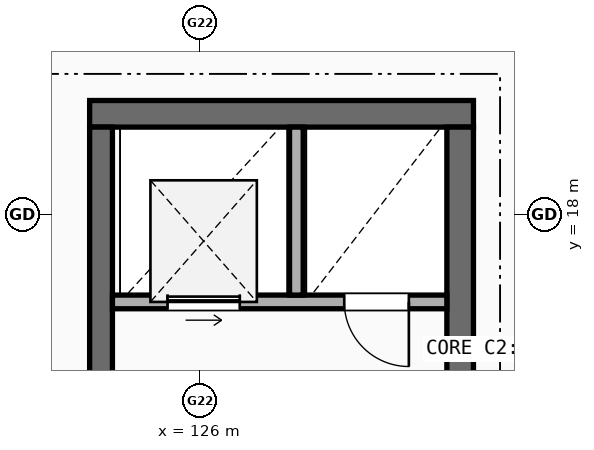
"""IFC4 building model, lengths in metres.
Left out: names, types, materials, properties, quantities, classifications, styles, units other than length and angle.
Written with IfcOpenShell. Run it as: python <this file> out.ifc"""

import sys

from ifc_helpers import new_model, si_unit, direction, frame, frame_2d, origin, place, context, subcontext, project, spatial, rectangle, extrude, element, fill, save


model = new_model("IFC4")
c1 = context("Model", 3, precision=1e-05, world=origin(), true_north=direction((0.0, 1.0)))
c2 = subcontext(c1, "Body", "Model", "MODEL_VIEW")
j1 = project(units=[si_unit("LENGTHUNIT", "METRE"), si_unit("PLANEANGLEUNIT", "RADIAN")], contexts=[c1])
p1 = place(None, origin())
s1 = spatial("IfcSite", under=j1, at=p1, CompositionType="ELEMENT")
p2 = place(p1, origin())
s2 = spatial("IfcBuilding", under=s1, at=p2, CompositionType="ELEMENT")
p3 = place(p2, frame((0.0, 0.0, 4.5)))
s3 = spatial("IfcBuildingStorey", under=s2, at=p3, CompositionType="ELEMENT", Elevation=4.5)
p4 = place(p3, frame((129.6, 19.325, 0.0), z_axis=(0.0, 0.0, 1.0), x_axis=(-1.0, 0.0, 0.0)))
e1 = element("IfcWall", 1, at=p4, inside=s3, PredefinedType="SHEAR", context=c2, shape_type="SweptSolid", body=[
    extrude(rectangle(XDim=5.05, YDim=0.35, at=frame_2d((2.525, 0.0))), origin(), (0.0, 0.0, 1.0), 2.945),
])
p5 = place(p3, frame((129.425, 12.75, 0.0), z_axis=(0.0, 0.0, 1.0), x_axis=(0.0, 1.0, 0.0)))
e2 = element("IfcWall", 2, at=p5, inside=s3, PredefinedType="SHEAR", context=c2, shape_type="SweptSolid", body=[
    extrude(rectangle(XDim=6.4, YDim=0.35, at=frame_2d((3.2, 0.0))), origin(), (0.0, 0.0, 1.0), 2.945),
])
p6 = place(p3, frame((124.7, 15.7, 0.0), z_axis=(0.0, 0.0, 1.0), x_axis=(0.0, 1.0, 0.0)))
e3 = element("IfcWall", 3, at=p6, inside=s3, PredefinedType="SHEAR", context=c2, shape_type="SweptSolid", body=[
    extrude(rectangle(XDim=3.45, YDim=0.3, at=frame_2d((1.725, 0.0))), origin(), (0.0, 0.0, 1.0), 2.945),
])
p7 = place(p3, frame((124.85, 16.85, 0.0), z_axis=(0.0, 0.0, 1.0), x_axis=(1.0, 0.0, 0.0)))
e4 = element("IfcWall", 4, at=p7, inside=s3, PredefinedType="SOLIDWALL", context=c2, shape_type="SweptSolid", body=[
    extrude(rectangle(XDim=4.4, YDim=0.18, at=frame_2d((2.2, 0.0))), origin(), (0.0, 0.0, 1.0), 2.945),
])
p8 = place(p7, frame((0.725, 0.0, 0.0)))
e5 = element("IfcOpeningElement", 5, at=p8, cuts=e4, PredefinedType="OPENING", context=c2, shape_type="SweptSolid", body=[
    extrude(rectangle(XDim=0.95, YDim=2.15, at=frame_2d((0.475, 1.075))), frame((0.0, 0.1, 0.0), z_axis=(0.0, -1.0, 0.0), x_axis=(1.0, 0.0, 0.0)), (0.0, 0.0, 1.0), 0.2),
])
p9 = place(p7, frame((3.05, 0.0, 0.0)))
e6 = element("IfcOpeningElement", 6, at=p9, cuts=e4, PredefinedType="OPENING", context=c2, shape_type="SweptSolid", body=[
    extrude(rectangle(XDim=0.85, YDim=2.1, at=frame_2d((0.425, 1.05))), frame((0.0, 0.1, 0.0), z_axis=(0.0, -1.0, 0.0), x_axis=(1.0, 0.0, 0.0)), (0.0, 0.0, 1.0), 0.2),
])
p10 = place(p3, frame((127.27, 16.94, 0.0), z_axis=(0.0, 0.0, 1.0), x_axis=(0.0, 1.0, 0.0)))
e7 = element("IfcWall", 7, at=p10, inside=s3, PredefinedType="SOLIDWALL", context=c2, shape_type="SweptSolid", body=[
    extrude(rectangle(XDim=2.21, YDim=0.18, at=frame_2d((1.105, 0.0))), origin(), (0.0, 0.0, 1.0), 2.945),
])
p11 = place(p8, origin())
e8 = element("IfcDoor", 8, at=p11, inside=s3, OperationType="SLIDING_TO_LEFT", PredefinedType="DOOR", context=c2, shape_type="SweptSolid", body=[
    extrude(rectangle(XDim=0.95, YDim=2.15, at=frame_2d((0.475, 1.075))), frame((0.0, 0.025, 0.0), z_axis=(0.0, -1.0, 0.0), x_axis=(1.0, 0.0, 0.0)), (0.0, 0.0, 1.0), 0.05),
])
fill(e5, e8)
p12 = place(p9, frame((0.85, 0.0, 0.0), z_axis=(0.0, 0.0, 1.0), x_axis=(-1.0, 0.0, 0.0)))
e9 = element("IfcDoor", 9, at=p12, inside=s3, OperationType="SINGLE_SWING_RIGHT", PredefinedType="DOOR", context=c2, shape_type="SweptSolid", body=[
    extrude(rectangle(XDim=0.85, YDim=2.1, at=frame_2d((0.425, 1.05))), frame((0.0, 0.025, 0.0), z_axis=(0.0, -1.0, 0.0), x_axis=(1.0, 0.0, 0.0)), (0.0, 0.0, 1.0), 0.05),
])
fill(e6, e9)
save(model, sys.argv[1])
